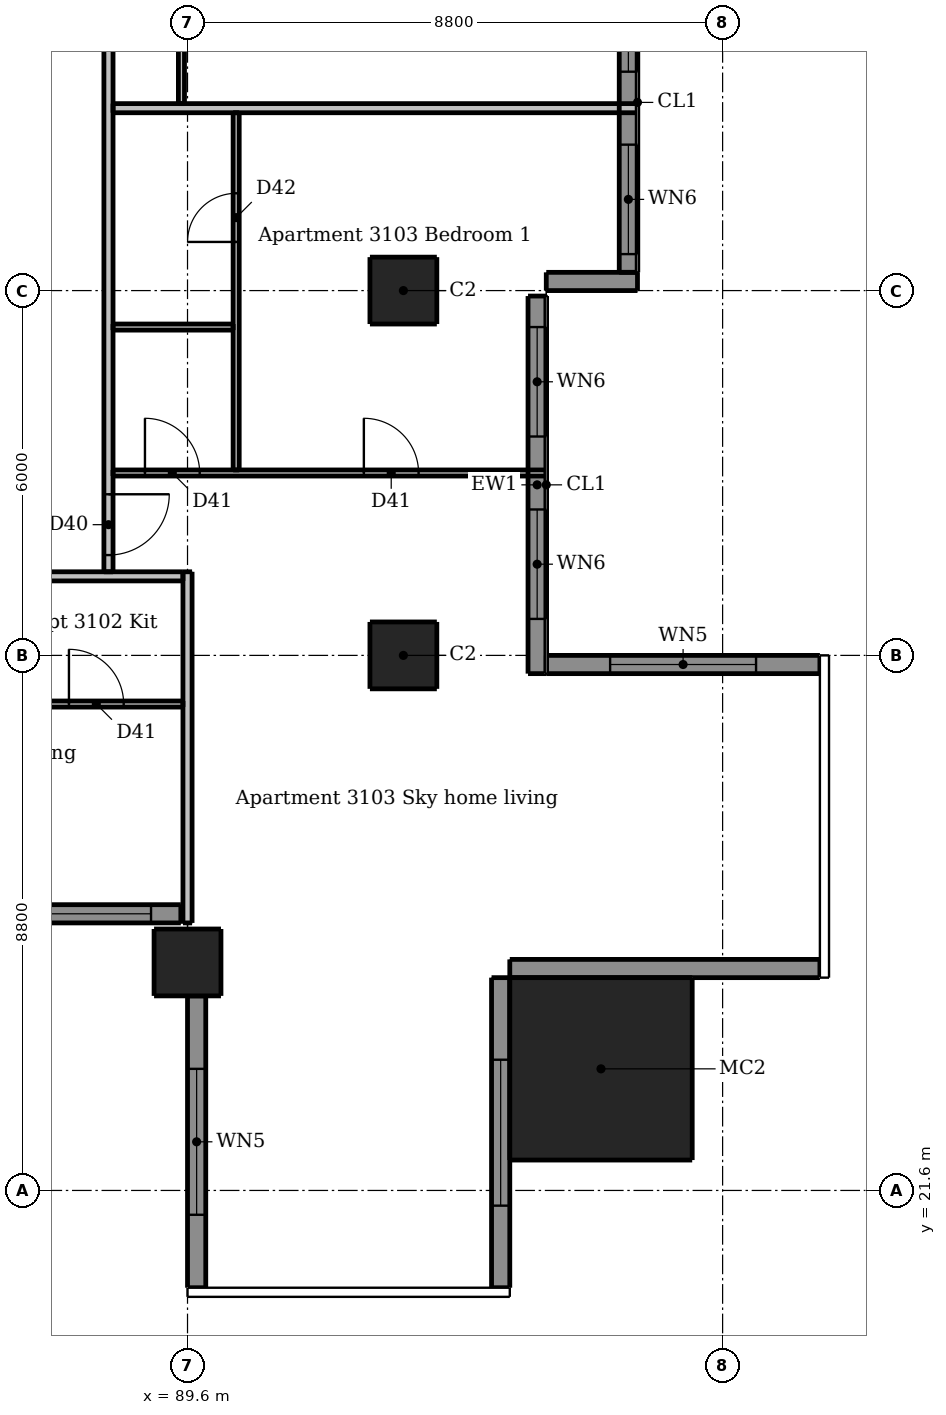
"""IFC4 building model, lengths in metres.
Left out: names, types, materials, properties, quantities, classifications, styles, units other than length and angle.
Written with IfcOpenShell. Run it as: python <this file> out.ifc"""

import sys

from ifc_helpers import new_model, si_unit, direction, frame, frame_2d, origin, origin_2d, place, context, subcontext, project, spatial, rectangle, extrude, element, fill, save


model = new_model("IFC4")
c1 = context("Model", 3, precision=1e-05, world=origin(), true_north=direction((0.0, 1.0)))
c2 = subcontext(c1, "Body", "Model", "MODEL_VIEW")
j1 = project(units=[si_unit("LENGTHUNIT", "METRE"), si_unit("PLANEANGLEUNIT", "RADIAN")], contexts=[c1])
p1 = place(None, origin())
s1 = spatial("IfcSite", under=j1, at=p1, CompositionType="ELEMENT")
p2 = place(p1, origin())
s2 = spatial("IfcBuilding", under=s1, at=p2, CompositionType="ELEMENT")
p3 = place(p2, frame((0.0, 0.0, 115.0)))
s3 = spatial("IfcBuildingStorey", under=s2, at=p3, CompositionType="ELEMENT", Elevation=115.0)
for number, where, z_axis, x_axis in (
    (1, (89.6, 25.35, 0.0), (0.0, 0.0, 1.0), (1.0, 0.0, 0.0)),
    (2, (93.15, 30.4, 0.0), (0.0, 0.0, 1.0), (1.0, 0.0, 0.0)),
    (3, (93.15, 36.4, 0.0), (0.0, 0.0, 1.0), (1.0, 0.0, 0.0)),
):
    element("IfcColumn", number, at=place(p3, frame(where, z_axis=z_axis, x_axis=x_axis)), inside=s3, PredefinedType="COLUMN", context=c2, shape_type="SweptSolid", body=[
        extrude(rectangle(XDim=1.1, YDim=1.1, at=origin_2d()), origin(), (0.0, 0.0, 1.0), 3.05),
    ])
p4 = place(p3, frame((96.4, 23.6, 0.0), z_axis=(0.0, 0.0, 1.0), x_axis=(1.0, 0.0, 0.0)))
e4 = element("IfcColumn", 4, at=p4, inside=s3, PredefinedType="COLUMN", context=c2, shape_type="SweptSolid", body=[
    extrude(rectangle(XDim=3.0, YDim=3.0, at=origin_2d()), origin(), (0.0, 0.0, 1.0), 3.3),
])
p5 = place(p3, frame((89.75, 24.8, 0.0), z_axis=(0.0, 0.0, 1.0), x_axis=(0.0, -1.0, 0.0)))
e5 = element("IfcWall", 5, at=p5, inside=s3, PredefinedType="SOLIDWALL", context=c2, shape_type="SweptSolid", body=[
    extrude(rectangle(XDim=4.8, YDim=0.3, at=frame_2d((2.4, 0.0))), origin(), (0.0, 0.0, 1.0), 3.05),
])
p6 = place(p5, frame((1.2, 0.0, 0.15)))
e6 = element("IfcOpeningElement", 6, at=p6, cuts=e5, PredefinedType="OPENING", context=c2, shape_type="SweptSolid", body=[
    extrude(rectangle(XDim=2.4, YDim=2.1, at=frame_2d((1.2, 1.05))), frame((0.0, 0.16, 0.0), z_axis=(0.0, -1.0, 0.0), x_axis=(1.0, 0.0, 0.0)), (0.0, 0.0, 1.0), 0.32),
])
p7 = place(p3, frame((94.75, 20.0, 0.0), z_axis=(0.0, 0.0, 1.0), x_axis=(0.0, 1.0, 0.0)))
e7 = element("IfcWall", 7, at=p7, inside=s3, PredefinedType="SOLIDWALL", context=c2, shape_type="SweptSolid", body=[
    extrude(rectangle(XDim=5.1, YDim=0.3, at=frame_2d((2.55, 0.0))), origin(), (0.0, 0.0, 1.0), 3.05),
])
p8 = place(p7, frame((1.35, 0.0, 0.15)))
e8 = element("IfcOpeningElement", 8, at=p8, cuts=e7, PredefinedType="OPENING", context=c2, shape_type="SweptSolid", body=[
    extrude(rectangle(XDim=2.4, YDim=2.1, at=frame_2d((1.2, 1.05))), frame((0.0, 0.16, 0.0), z_axis=(0.0, -1.0, 0.0), x_axis=(1.0, 0.0, 0.0)), (0.0, 0.0, 1.0), 0.32),
])
p9 = place(p3, frame((94.9, 25.25, 0.0), z_axis=(0.0, 0.0, 1.0), x_axis=(1.0, 0.0, 0.0)))
e9 = element("IfcWall", 9, at=p9, inside=s3, PredefinedType="SOLIDWALL", context=c2, shape_type="SweptSolid", body=[
    extrude(rectangle(XDim=5.1, YDim=0.3, at=frame_2d((2.55, 0.0))), origin(), (0.0, 0.0, 1.0), 3.05),
])
p10 = place(p3, frame((100.0, 30.25, 0.0), z_axis=(0.0, 0.0, 1.0), x_axis=(-1.0, 0.0, 0.0)))
e10 = element("IfcWall", 10, at=p10, inside=s3, PredefinedType="SOLIDWALL", context=c2, shape_type="SweptSolid", body=[
    extrude(rectangle(XDim=4.5, YDim=0.3, at=frame_2d((2.25, 0.0))), origin(), (0.0, 0.0, 1.0), 3.05),
])
p11 = place(p10, frame((1.05, 0.0, 0.15)))
e11 = element("IfcOpeningElement", 11, at=p11, cuts=e10, PredefinedType="OPENING", context=c2, shape_type="SweptSolid", body=[
    extrude(rectangle(XDim=2.4, YDim=2.1, at=frame_2d((1.2, 1.05))), frame((0.0, 0.16, 0.0), z_axis=(0.0, -1.0, 0.0), x_axis=(1.0, 0.0, 0.0)), (0.0, 0.0, 1.0), 0.32),
])
p12 = place(p3, frame((95.5, 36.55, 0.0), z_axis=(0.0, 0.0, 1.0), x_axis=(1.0, 0.0, 0.0)))
e12 = element("IfcWall", 12, at=p12, inside=s3, PredefinedType="SOLIDWALL", context=c2, shape_type="SweptSolid", body=[
    extrude(rectangle(XDim=1.5, YDim=0.3, at=frame_2d((0.75, 0.0))), origin(), (0.0, 0.0, 1.0), 3.05),
])
p13 = place(p3, frame((83.7, 26.15, 0.0), z_axis=(0.0, 0.0, 1.0), x_axis=(1.0, 0.0, 0.0)))
e13 = element("IfcWall", 13, at=p13, inside=s3, PredefinedType="SOLIDWALL", context=c2, shape_type="SweptSolid", body=[
    extrude(rectangle(XDim=5.79, YDim=0.3, at=frame_2d((2.895, 0.0))), origin(), (0.0, 0.0, 1.0), 3.05),
])
p14 = place(p13, frame((0.5, 0.0, 0.15)))
e14 = element("IfcOpeningElement", 14, at=p14, cuts=e13, PredefinedType="OPENING", context=c2, shape_type="SweptSolid", body=[
    extrude(rectangle(XDim=1.8, YDim=2.1, at=frame_2d((0.9, 1.05))), frame((0.0, 0.16, 0.0), z_axis=(0.0, -1.0, 0.0), x_axis=(1.0, 0.0, 0.0)), (0.0, 0.0, 1.0), 0.32),
])
p15 = place(p13, frame((3.5, 0.0, 0.15)))
e15 = element("IfcOpeningElement", 15, at=p15, cuts=e13, PredefinedType="OPENING", context=c2, shape_type="SweptSolid", body=[
    extrude(rectangle(XDim=1.8, YDim=2.1, at=frame_2d((0.9, 1.05))), frame((0.0, 0.16, 0.0), z_axis=(0.0, -1.0, 0.0), x_axis=(1.0, 0.0, 0.0)), (0.0, 0.0, 1.0), 0.32),
])
p16 = place(p3, frame((95.35, 30.1, 0.0), z_axis=(0.0, 0.0, 1.0), x_axis=(0.0, 1.0, 0.0)))
e16 = element("IfcWall", 16, at=p16, inside=s3, PredefinedType="SOLIDWALL", context=c2, shape_type="SweptSolid", body=[
    extrude(rectangle(XDim=6.21, YDim=0.3, at=frame_2d((3.105, 0.0))), origin(), (0.0, 0.0, 1.0), 3.05),
])
p17 = place(p16, frame((0.9, 0.0, 0.15)))
e17 = element("IfcOpeningElement", 17, at=p17, cuts=e16, PredefinedType="OPENING", context=c2, shape_type="SweptSolid", body=[
    extrude(rectangle(XDim=1.8, YDim=2.1, at=frame_2d((0.9, 1.05))), frame((0.0, 0.16, 0.0), z_axis=(0.0, -1.0, 0.0), x_axis=(1.0, 0.0, 0.0)), (0.0, 0.0, 1.0), 0.32),
])
p18 = place(p16, frame((3.9, 0.0, 0.15)))
e18 = element("IfcOpeningElement", 18, at=p18, cuts=e16, PredefinedType="OPENING", context=c2, shape_type="SweptSolid", body=[
    extrude(rectangle(XDim=1.8, YDim=2.1, at=frame_2d((0.9, 1.05))), frame((0.0, 0.16, 0.0), z_axis=(0.0, -1.0, 0.0), x_axis=(1.0, 0.0, 0.0)), (0.0, 0.0, 1.0), 0.32),
])
p19 = place(p3, frame((96.85, 36.7, 0.0), z_axis=(0.0, 0.0, 1.0), x_axis=(0.0, 1.0, 0.0)))
e19 = element("IfcWall", 19, at=p19, inside=s3, PredefinedType="SOLIDWALL", context=c2, shape_type="SweptSolid", body=[
    extrude(rectangle(XDim=5.59, YDim=0.3, at=frame_2d((2.795, 0.0))), origin(), (0.0, 0.0, 1.0), 3.05),
])
p20 = place(p19, frame((0.3, 0.0, 0.15)))
e20 = element("IfcOpeningElement", 20, at=p20, cuts=e19, PredefinedType="OPENING", context=c2, shape_type="SweptSolid", body=[
    extrude(rectangle(XDim=1.8, YDim=2.1, at=frame_2d((0.9, 1.05))), frame((0.0, 0.16, 0.0), z_axis=(0.0, -1.0, 0.0), x_axis=(1.0, 0.0, 0.0)), (0.0, 0.0, 1.0), 0.32),
])
p21 = place(p19, frame((3.3, 0.0, 0.15)))
e21 = element("IfcOpeningElement", 21, at=p21, cuts=e19, PredefinedType="OPENING", context=c2, shape_type="SweptSolid", body=[
    extrude(rectangle(XDim=1.8, YDim=2.1, at=frame_2d((0.9, 1.05))), frame((0.0, 0.16, 0.0), z_axis=(0.0, -1.0, 0.0), x_axis=(1.0, 0.0, 0.0)), (0.0, 0.0, 1.0), 0.32),
])
p22 = place(p3, frame((89.5, 54.325, 0.0), z_axis=(0.0, 0.0, 1.0), x_axis=(0.0, -1.0, 0.0)))
e22 = element("IfcWall", 22, at=p22, inside=s3, PredefinedType="PARTITIONING", context=c2, shape_type="SweptSolid", body=[
    extrude(rectangle(XDim=14.85, YDim=0.1, at=frame_2d((7.425, 0.0))), origin(), (0.0, 0.0, 1.0), 3.05),
])
p23 = place(p22, frame((5.775, 0.0, 0.0)))
e23 = element("IfcOpeningElement", 23, at=p23, cuts=e22, PredefinedType="OPENING", context=c2, shape_type="SweptSolid", body=[
    extrude(rectangle(XDim=0.9, YDim=2.1, at=frame_2d((0.45, 1.05))), frame((0.0, 0.06, 0.0), z_axis=(0.0, -1.0, 0.0), x_axis=(1.0, 0.0, 0.0)), (0.0, 0.0, 1.0), 0.12),
])
p24 = place(p22, frame((0.975, 0.0, 0.0)))
e24 = element("IfcOpeningElement", 24, at=p24, cuts=e22, PredefinedType="OPENING", context=c2, shape_type="SweptSolid", body=[
    extrude(rectangle(XDim=0.9, YDim=2.1, at=frame_2d((0.45, 1.05))), frame((0.0, 0.06, 0.0), z_axis=(0.0, -1.0, 0.0), x_axis=(1.0, 0.0, 0.0)), (0.0, 0.0, 1.0), 0.12),
])
p25 = place(p22, frame((12.975, 0.0, 0.0)))
e25 = element("IfcOpeningElement", 25, at=p25, cuts=e22, PredefinedType="OPENING", context=c2, shape_type="SweptSolid", body=[
    extrude(rectangle(XDim=0.9, YDim=2.1, at=frame_2d((0.45, 1.05))), frame((0.0, 0.06, 0.0), z_axis=(0.0, -1.0, 0.0), x_axis=(1.0, 0.0, 0.0)), (0.0, 0.0, 1.0), 0.12),
])
p26 = place(p22, frame((10.325, 0.0, 0.0)))
e26 = element("IfcOpeningElement", 26, at=p26, cuts=e22, PredefinedType="OPENING", context=c2, shape_type="SweptSolid", body=[
    extrude(rectangle(XDim=0.8, YDim=2.1, at=frame_2d((0.4, 1.05))), frame((0.0, 0.06, 0.0), z_axis=(0.0, -1.0, 0.0), x_axis=(1.0, 0.0, 0.0)), (0.0, 0.0, 1.0), 0.12),
])
p27 = place(p3, frame((90.4, 33.45, 0.0), z_axis=(0.0, 0.0, 1.0), x_axis=(0.0, 1.0, 0.0)))
e27 = element("IfcWall", 27, at=p27, inside=s3, PredefinedType="PARTITIONING", context=c2, shape_type="SweptSolid", body=[
    extrude(rectangle(XDim=5.875, YDim=0.1, at=frame_2d((2.938, 0.0))), origin(), (0.0, 0.0, 1.0), 3.05),
])
p28 = place(p27, frame((3.75, 0.0, 0.0)))
e28 = element("IfcOpeningElement", 28, at=p28, cuts=e27, PredefinedType="OPENING", context=c2, shape_type="SweptSolid", body=[
    extrude(rectangle(XDim=0.8, YDim=2.1, at=frame_2d((0.4, 1.05))), frame((0.0, 0.06, 0.0), z_axis=(0.0, -1.0, 0.0), x_axis=(1.0, 0.0, 0.0)), (0.0, 0.0, 1.0), 0.12),
])
p29 = place(p3, frame((88.375, 35.8, 0.0), z_axis=(0.0, 0.0, 1.0), x_axis=(1.0, 0.0, 0.0)))
e29 = element("IfcWall", 29, at=p29, inside=s3, PredefinedType="PARTITIONING", context=c2, shape_type="SweptSolid", body=[
    extrude(rectangle(XDim=1.975, YDim=0.1, at=frame_2d((0.988, 0.0))), origin(), (0.0, 0.0, 1.0), 3.05),
])
p30 = place(p3, frame((88.375, 33.4, 0.0), z_axis=(0.0, 0.0, 1.0), x_axis=(1.0, 0.0, 0.0)))
e30 = element("IfcWall", 30, at=p30, inside=s3, PredefinedType="PARTITIONING", context=c2, shape_type="SweptSolid", body=[
    extrude(rectangle(XDim=7.125, YDim=0.1, at=frame_2d((3.562, 0.0))), origin(), (0.0, 0.0, 1.0), 3.05),
])
p31 = place(p30, frame((0.525, 0.0, 0.0)))
e31 = element("IfcOpeningElement", 31, at=p31, cuts=e30, PredefinedType="OPENING", context=c2, shape_type="SweptSolid", body=[
    extrude(rectangle(XDim=0.9, YDim=2.1, at=frame_2d((0.45, 1.05))), frame((0.0, 0.06, 0.0), z_axis=(0.0, -1.0, 0.0), x_axis=(1.0, 0.0, 0.0)), (0.0, 0.0, 1.0), 0.12),
])
p32 = place(p30, frame((4.125, 0.0, 0.0)))
e32 = element("IfcOpeningElement", 32, at=p32, cuts=e30, PredefinedType="OPENING", context=c2, shape_type="SweptSolid", body=[
    extrude(rectangle(XDim=0.9, YDim=2.1, at=frame_2d((0.45, 1.05))), frame((0.0, 0.06, 0.0), z_axis=(0.0, -1.0, 0.0), x_axis=(1.0, 0.0, 0.0)), (0.0, 0.0, 1.0), 0.12),
])
p33 = place(p3, frame((86.65, 29.6, 0.0), z_axis=(0.0, 0.0, 1.0), x_axis=(1.0, 0.0, 0.0)))
e33 = element("IfcWall", 33, at=p33, inside=s3, PredefinedType="PARTITIONING", context=c2, shape_type="SweptSolid", body=[
    extrude(rectangle(XDim=2.875, YDim=0.1, at=frame_2d((1.438, 0.0))), origin(), (0.0, 0.0, 1.0), 3.05),
])
p34 = place(p33, frame((1.0, 0.0, 0.0)))
e34 = element("IfcOpeningElement", 34, at=p34, cuts=e33, PredefinedType="OPENING", context=c2, shape_type="SweptSolid", body=[
    extrude(rectangle(XDim=0.9, YDim=2.1, at=frame_2d((0.45, 1.05))), frame((0.0, 0.06, 0.0), z_axis=(0.0, -1.0, 0.0), x_axis=(1.0, 0.0, 0.0)), (0.0, 0.0, 1.0), 0.12),
])
p35 = place(p3, frame((88.3, 60.475, 0.0), z_axis=(0.0, 0.0, 1.0), x_axis=(0.0, -1.0, 0.0)))
e35 = element("IfcWall", 35, at=p35, inside=s3, PredefinedType="PARTITIONING", context=c2, shape_type="SweptSolid", body=[
    extrude(rectangle(XDim=28.7, YDim=0.15, at=frame_2d((14.35, 0.0))), origin(), (0.0, 0.0, 1.0), 3.05),
])
p36 = place(p35, frame((27.425, 0.0, 0.0)))
e36 = element("IfcOpeningElement", 36, at=p36, cuts=e35, PredefinedType="OPENING", context=c2, shape_type="SweptSolid", body=[
    extrude(rectangle(XDim=1.0, YDim=2.1, at=frame_2d((0.5, 1.05))), frame((0.0, 0.085, 0.0), z_axis=(0.0, -1.0, 0.0), x_axis=(1.0, 0.0, 0.0)), (0.0, 0.0, 1.0), 0.17),
])
p37 = place(p35, frame((13.075, 0.0, 0.0)))
e37 = element("IfcOpeningElement", 37, at=p37, cuts=e35, PredefinedType="OPENING", context=c2, shape_type="SweptSolid", body=[
    extrude(rectangle(XDim=1.0, YDim=2.1, at=frame_2d((0.5, 1.05))), frame((0.0, 0.085, 0.0), z_axis=(0.0, -1.0, 0.0), x_axis=(1.0, 0.0, 0.0)), (0.0, 0.0, 1.0), 0.17),
])
p38 = place(p35, frame((2.575, 0.0, 0.0)))
e38 = element("IfcOpeningElement", 38, at=p38, cuts=e35, PredefinedType="OPENING", context=c2, shape_type="SweptSolid", body=[
    extrude(rectangle(XDim=1.0, YDim=2.1, at=frame_2d((0.5, 1.05))), frame((0.0, 0.085, 0.0), z_axis=(0.0, -1.0, 0.0), x_axis=(1.0, 0.0, 0.0)), (0.0, 0.0, 1.0), 0.17),
])
p39 = place(p3, frame((89.6, 26.0, 0.0), z_axis=(0.0, 0.0, 1.0), x_axis=(0.0, 1.0, 0.0)))
e39 = element("IfcWall", 39, at=p39, inside=s3, PredefinedType="PARTITIONING", context=c2, shape_type="SweptSolid", body=[
    extrude(rectangle(XDim=5.775, YDim=0.15, at=frame_2d((2.887, 0.0))), origin(), (0.0, 0.0, 1.0), 2.516),
])
p40 = place(p3, frame((88.375, 39.4, 0.0), z_axis=(0.0, 0.0, 1.0), x_axis=(1.0, 0.0, 0.0)))
e40 = element("IfcWall", 40, at=p40, inside=s3, PredefinedType="PARTITIONING", context=c2, shape_type="SweptSolid", body=[
    extrude(rectangle(XDim=8.625, YDim=0.15, at=frame_2d((4.312, 0.0))), origin(), (0.0, 0.0, 1.0), 3.05),
])
p41 = place(p3, frame((89.525, 31.7, 0.0), z_axis=(0.0, 0.0, 1.0), x_axis=(-1.0, 0.0, 0.0)))
e41 = element("IfcWall", 41, at=p41, inside=s3, PredefinedType="PARTITIONING", context=c2, shape_type="SweptSolid", body=[
    extrude(rectangle(XDim=28.75, YDim=0.15, at=frame_2d((14.375, 0.0))), origin(), (0.0, 0.0, 1.0), 3.05),
])
p42 = place(p41, frame((24.625, 0.0, 0.0)))
e42 = element("IfcOpeningElement", 42, at=p42, cuts=e41, PredefinedType="OPENING", context=c2, shape_type="SweptSolid", body=[
    extrude(rectangle(XDim=1.0, YDim=2.1, at=frame_2d((0.5, 1.05))), frame((0.0, 0.085, 0.0), z_axis=(0.0, -1.0, 0.0), x_axis=(1.0, 0.0, 0.0)), (0.0, 0.0, 1.0), 0.17),
])
p43 = place(p41, frame((5.425, 0.0, 0.0)))
e43 = element("IfcOpeningElement", 43, at=p43, cuts=e41, PredefinedType="OPENING", context=c2, shape_type="SweptSolid", body=[
    extrude(rectangle(XDim=1.0, YDim=2.1, at=frame_2d((0.5, 1.05))), frame((0.0, 0.085, 0.0), z_axis=(0.0, -1.0, 0.0), x_axis=(1.0, 0.0, 0.0)), (0.0, 0.0, 1.0), 0.17),
])
p44 = place(p6, origin())
e44 = element("IfcWindow", 44, at=p44, inside=s3, PartitioningType="DOUBLE_PANEL_VERTICAL", PredefinedType="WINDOW", context=c2, shape_type="SweptSolid", body=[
    extrude(rectangle(XDim=2.4, YDim=2.1, at=frame_2d((1.2, 1.05))), frame((0.0, 0.03, 0.0), z_axis=(0.0, -1.0, 0.0), x_axis=(1.0, 0.0, 0.0)), (0.0, 0.0, 1.0), 0.06),
])
fill(e6, e44)
p45 = place(p8, origin())
e45 = element("IfcWindow", 45, at=p45, inside=s3, PartitioningType="DOUBLE_PANEL_VERTICAL", PredefinedType="WINDOW", context=c2, shape_type="SweptSolid", body=[
    extrude(rectangle(XDim=2.4, YDim=2.1, at=frame_2d((1.2, 1.05))), frame((0.0, 0.03, 0.0), z_axis=(0.0, -1.0, 0.0), x_axis=(1.0, 0.0, 0.0)), (0.0, 0.0, 1.0), 0.06),
])
fill(e8, e45)
p46 = place(p11, origin())
e46 = element("IfcWindow", 46, at=p46, inside=s3, PartitioningType="DOUBLE_PANEL_VERTICAL", PredefinedType="WINDOW", context=c2, shape_type="SweptSolid", body=[
    extrude(rectangle(XDim=2.4, YDim=2.1, at=frame_2d((1.2, 1.05))), frame((0.0, 0.03, 0.0), z_axis=(0.0, -1.0, 0.0), x_axis=(1.0, 0.0, 0.0)), (0.0, 0.0, 1.0), 0.06),
])
fill(e11, e46)
p47 = place(p15, origin())
e47 = element("IfcWindow", 47, at=p47, inside=s3, PartitioningType="DOUBLE_PANEL_VERTICAL", PredefinedType="WINDOW", context=c2, shape_type="SweptSolid", body=[
    extrude(rectangle(XDim=1.8, YDim=2.1, at=frame_2d((0.9, 1.05))), frame((0.0, 0.03, 0.0), z_axis=(0.0, -1.0, 0.0), x_axis=(1.0, 0.0, 0.0)), (0.0, 0.0, 1.0), 0.06),
])
fill(e15, e47)
p48 = place(p17, origin())
e48 = element("IfcWindow", 48, at=p48, inside=s3, PartitioningType="DOUBLE_PANEL_VERTICAL", PredefinedType="WINDOW", context=c2, shape_type="SweptSolid", body=[
    extrude(rectangle(XDim=1.8, YDim=2.1, at=frame_2d((0.9, 1.05))), frame((0.0, 0.03, 0.0), z_axis=(0.0, -1.0, 0.0), x_axis=(1.0, 0.0, 0.0)), (0.0, 0.0, 1.0), 0.06),
])
fill(e17, e48)
p49 = place(p18, origin())
e49 = element("IfcWindow", 49, at=p49, inside=s3, PartitioningType="DOUBLE_PANEL_VERTICAL", PredefinedType="WINDOW", context=c2, shape_type="SweptSolid", body=[
    extrude(rectangle(XDim=1.8, YDim=2.1, at=frame_2d((0.9, 1.05))), frame((0.0, 0.03, 0.0), z_axis=(0.0, -1.0, 0.0), x_axis=(1.0, 0.0, 0.0)), (0.0, 0.0, 1.0), 0.06),
])
fill(e18, e49)
p50 = place(p20, origin())
e50 = element("IfcWindow", 50, at=p50, inside=s3, PartitioningType="DOUBLE_PANEL_VERTICAL", PredefinedType="WINDOW", context=c2, shape_type="SweptSolid", body=[
    extrude(rectangle(XDim=1.8, YDim=2.1, at=frame_2d((0.9, 1.05))), frame((0.0, 0.03, 0.0), z_axis=(0.0, -1.0, 0.0), x_axis=(1.0, 0.0, 0.0)), (0.0, 0.0, 1.0), 0.06),
])
fill(e20, e50)
p51 = place(p21, origin())
e51 = element("IfcWindow", 51, at=p51, inside=s3, PartitioningType="DOUBLE_PANEL_VERTICAL", PredefinedType="WINDOW", context=c2, shape_type="SweptSolid", body=[
    extrude(rectangle(XDim=1.8, YDim=2.1, at=frame_2d((0.9, 1.05))), frame((0.0, 0.03, 0.0), z_axis=(0.0, -1.0, 0.0), x_axis=(1.0, 0.0, 0.0)), (0.0, 0.0, 1.0), 0.06),
])
fill(e21, e51)
p52 = place(p34, origin())
e52 = element("IfcDoor", 52, at=p52, inside=s3, OperationType="SINGLE_SWING_LEFT", PredefinedType="DOOR", context=c2, shape_type="SweptSolid", body=[
    extrude(rectangle(XDim=0.9, YDim=2.1, at=frame_2d((0.45, 1.05))), frame((0.0, 0.025, 0.0), z_axis=(0.0, -1.0, 0.0), x_axis=(1.0, 0.0, 0.0)), (0.0, 0.0, 1.0), 0.05),
])
fill(e34, e52)
p53 = place(p36, origin())
e53 = element("IfcDoor", 53, at=p53, inside=s3, OperationType="SINGLE_SWING_LEFT", PredefinedType="DOOR", context=c2, shape_type="SweptSolid", body=[
    extrude(rectangle(XDim=1.0, YDim=2.1, at=frame_2d((0.5, 1.05))), frame((0.0, 0.025, 0.0), z_axis=(0.0, -1.0, 0.0), x_axis=(1.0, 0.0, 0.0)), (0.0, 0.0, 1.0), 0.05),
])
fill(e36, e53)
p54 = place(p31, origin())
e54 = element("IfcDoor", 54, at=p54, inside=s3, OperationType="SINGLE_SWING_LEFT", PredefinedType="DOOR", context=c2, shape_type="SweptSolid", body=[
    extrude(rectangle(XDim=0.9, YDim=2.1, at=frame_2d((0.45, 1.05))), frame((0.0, 0.025, 0.0), z_axis=(0.0, -1.0, 0.0), x_axis=(1.0, 0.0, 0.0)), (0.0, 0.0, 1.0), 0.05),
])
fill(e31, e54)
p55 = place(p32, origin())
e55 = element("IfcDoor", 55, at=p55, inside=s3, OperationType="SINGLE_SWING_LEFT", PredefinedType="DOOR", context=c2, shape_type="SweptSolid", body=[
    extrude(rectangle(XDim=0.9, YDim=2.1, at=frame_2d((0.45, 1.05))), frame((0.0, 0.025, 0.0), z_axis=(0.0, -1.0, 0.0), x_axis=(1.0, 0.0, 0.0)), (0.0, 0.0, 1.0), 0.05),
])
fill(e32, e55)
p56 = place(p28, origin())
e56 = element("IfcDoor", 56, at=p56, inside=s3, OperationType="SINGLE_SWING_LEFT", PredefinedType="DOOR", context=c2, shape_type="SweptSolid", body=[
    extrude(rectangle(XDim=0.8, YDim=2.1, at=frame_2d((0.4, 1.05))), frame((0.0, 0.025, 0.0), z_axis=(0.0, -1.0, 0.0), x_axis=(1.0, 0.0, 0.0)), (0.0, 0.0, 1.0), 0.05),
])
fill(e28, e56)
save(model, sys.argv[1])
